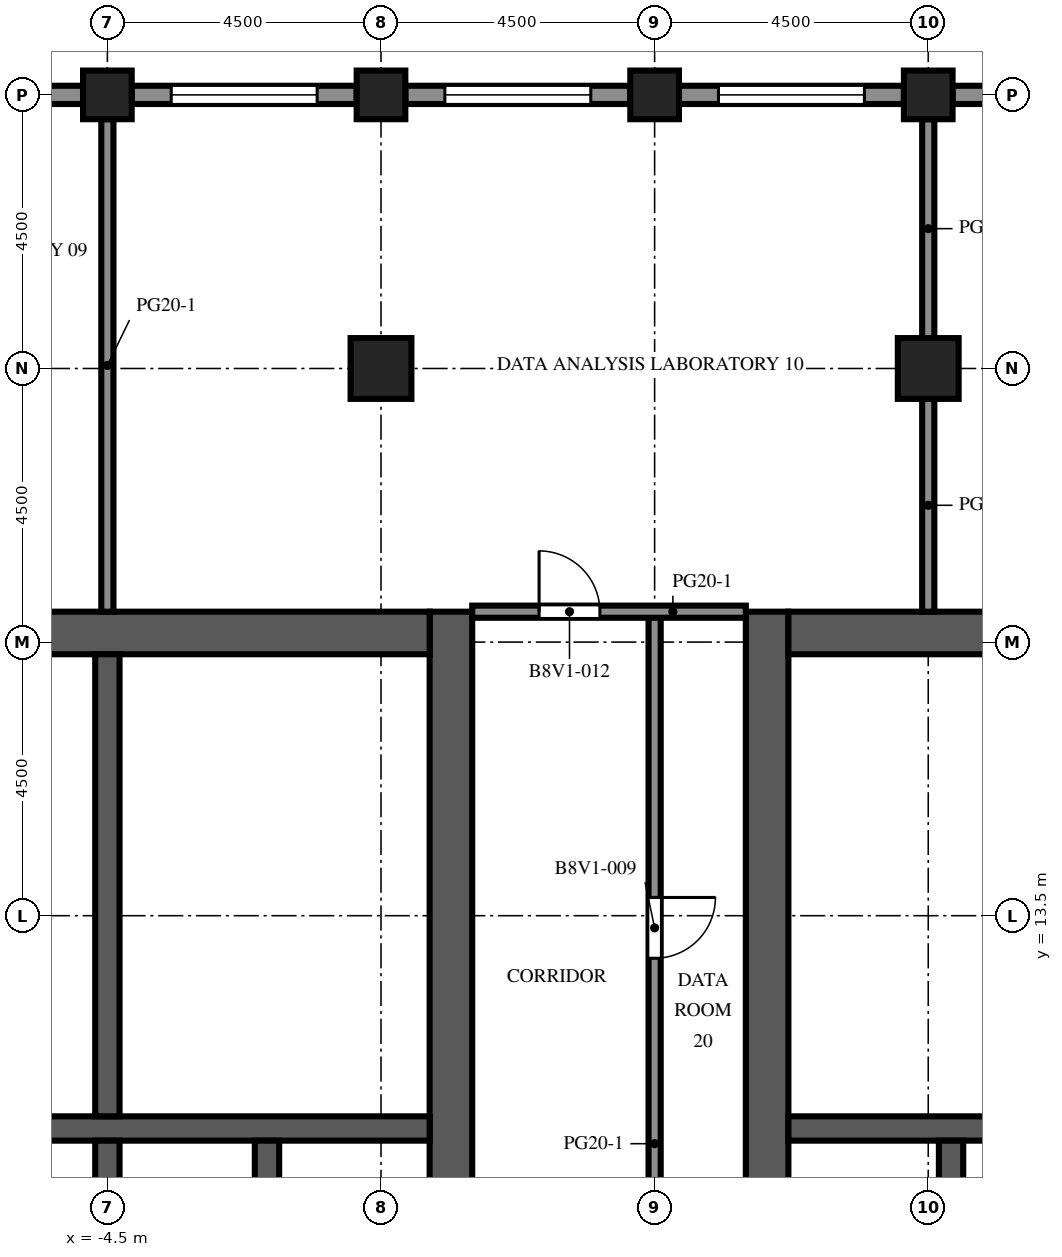
"""IFC4 building model, lengths in metres.
Left out: names, types, materials, properties, quantities, classifications, styles, units other than length and angle.
Written with IfcOpenShell. Run it as: python <this file> out.ifc"""

import sys

from ifc_helpers import new_model, si_unit, direction, frame, frame_2d, origin, origin_2d, place, context, subcontext, project, spatial, rectangle, extrude, element, fill, save


model = new_model("IFC4")
c1 = context("Model", 3, precision=1e-05, world=origin(), true_north=direction((0.0, 1.0)))
c2 = subcontext(c1, "Body", "Model", "MODEL_VIEW")
j1 = project(units=[si_unit("LENGTHUNIT", "METRE"), si_unit("PLANEANGLEUNIT", "RADIAN")], contexts=[c1])
p1 = place(None, origin())
s1 = spatial("IfcSite", under=j1, at=p1, CompositionType="ELEMENT")
p2 = place(p1, origin())
s2 = spatial("IfcBuilding", under=s1, at=p2, CompositionType="ELEMENT")
p3 = place(p2, frame((0.0, 0.0, 274.5)))
s3 = spatial("IfcBuildingStorey", under=s2, at=p3, CompositionType="ELEMENT", Elevation=274.5)
for number, where, z_axis, x_axis in (
    (1, (-4.5, 27.0, 0.0), (0.0, 0.0, 1.0), (1.0, 0.0, 0.0)),
    (2, (0.0, 27.0, 0.0), (0.0, 0.0, 1.0), (1.0, 0.0, 0.0)),
    (3, (4.5, 27.0, 0.0), (0.0, 0.0, 1.0), (1.0, 0.0, 0.0)),
    (4, (9.0, 27.0, 0.0), (0.0, 0.0, 1.0), (1.0, 0.0, 0.0)),
):
    element("IfcColumn", number, at=place(p3, frame(where, z_axis=z_axis, x_axis=x_axis)), inside=s3, PredefinedType="COLUMN", context=c2, shape_type="SweptSolid", body=[
        extrude(rectangle(XDim=0.8, YDim=0.8, at=origin_2d()), origin(), (0.0, 0.0, 1.0), 4.1),
    ])
for number, where, z_axis, x_axis in (
    (5, (0.0, 22.5, 0.0), (0.0, 0.0, 1.0), (1.0, 0.0, 0.0)),
    (6, (9.0, 22.5, 0.0), (0.0, 0.0, 1.0), (1.0, 0.0, 0.0)),
):
    element("IfcColumn", number, at=place(p3, frame(where, z_axis=z_axis, x_axis=x_axis)), inside=s3, PredefinedType="COLUMN", context=c2, shape_type="SweptSolid", body=[
        extrude(rectangle(XDim=1.0, YDim=1.0, at=origin_2d()), origin(), (0.0, 0.0, 1.0), 4.1),
    ])
p4 = place(p3, frame((1.15, -9.0, 0.0), z_axis=(0.0, 0.0, 1.0), x_axis=(0.0, 1.0, 0.0)))
e7 = element("IfcWall", 7, at=p4, inside=s3, PredefinedType="SHEAR", context=c2, shape_type="SweptSolid", body=[
    extrude(rectangle(XDim=27.5, YDim=0.7, at=frame_2d((13.75, 0.0))), origin(), (0.0, 0.0, 1.0), 4.1),
])
p5 = place(p4, frame((12.55, 0.0, 0.0)))
e8 = element("IfcOpeningElement", 8, at=p5, cuts=e7, PredefinedType="OPENING", context=c2, shape_type="SweptSolid", body=[
    extrude(rectangle(XDim=2.4, YDim=2.4, at=frame_2d((1.2, 1.2))), frame((0.0, 0.36, 0.0), z_axis=(0.0, -1.0, 0.0), x_axis=(1.0, 0.0, 0.0)), (0.0, 0.0, 1.0), 0.72),
])
p6 = place(p4, frame((3.9, 0.0, 0.0)))
e9 = element("IfcOpeningElement", 9, at=p6, cuts=e7, PredefinedType="OPENING", context=c2, shape_type="SweptSolid", body=[
    extrude(rectangle(XDim=1.2, YDim=2.1, at=frame_2d((0.6, 1.05))), frame((0.0, 0.36, 0.0), z_axis=(0.0, -1.0, 0.0), x_axis=(1.0, 0.0, 0.0)), (0.0, 0.0, 1.0), 0.72),
])
p7 = place(p4, frame((19.46, 0.0, 0.0)))
e10 = element("IfcOpeningElement", 10, at=p7, cuts=e7, PredefinedType="OPENING", context=c2, shape_type="SweptSolid", body=[
    extrude(rectangle(XDim=1.0, YDim=2.1, at=frame_2d((0.5, 1.05))), frame((0.0, 0.36, 0.0), z_axis=(0.0, -1.0, 0.0), x_axis=(1.0, 0.0, 0.0)), (0.0, 0.0, 1.0), 0.72),
])
p8 = place(p4, frame((21.17, 0.0, 0.0)))
e11 = element("IfcOpeningElement", 11, at=p8, cuts=e7, PredefinedType="OPENING", context=c2, shape_type="SweptSolid", body=[
    extrude(rectangle(XDim=1.0, YDim=2.1, at=frame_2d((0.5, 1.05))), frame((0.0, 0.36, 0.0), z_axis=(0.0, -1.0, 0.0), x_axis=(1.0, 0.0, 0.0)), (0.0, 0.0, 1.0), 0.72),
])
p9 = place(p4, frame((23.26, 0.0, 0.0)))
e12 = element("IfcOpeningElement", 12, at=p9, cuts=e7, PredefinedType="OPENING", context=c2, shape_type="SweptSolid", body=[
    extrude(rectangle(XDim=1.0, YDim=2.1, at=frame_2d((0.5, 1.05))), frame((0.0, 0.36, 0.0), z_axis=(0.0, -1.0, 0.0), x_axis=(1.0, 0.0, 0.0)), (0.0, 0.0, 1.0), 0.72),
])
p10 = place(p4, frame((25.35, 0.0, 0.0)))
e13 = element("IfcOpeningElement", 13, at=p10, cuts=e7, PredefinedType="OPENING", context=c2, shape_type="SweptSolid", body=[
    extrude(rectangle(XDim=1.0, YDim=2.1, at=frame_2d((0.5, 1.05))), frame((0.0, 0.36, 0.0), z_axis=(0.0, -1.0, 0.0), x_axis=(1.0, 0.0, 0.0)), (0.0, 0.0, 1.0), 0.72),
])
p11 = place(p3, frame((-9.8, 18.15, 0.0), z_axis=(0.0, 0.0, 1.0), x_axis=(1.0, 0.0, 0.0)))
e14 = element("IfcWall", 14, at=p11, inside=s3, PredefinedType="SHEAR", context=c2, shape_type="SweptSolid", body=[
    extrude(rectangle(XDim=10.6, YDim=0.7, at=frame_2d((5.3, 0.0))), origin(), (0.0, 0.0, 1.0), 4.1),
])
p12 = place(p3, frame((-9.8, 10.0, 0.0), z_axis=(0.0, 0.0, 1.0), x_axis=(1.0, 0.0, 0.0)))
e15 = element("IfcWall", 15, at=p12, inside=s3, PredefinedType="SHEAR", context=c2, shape_type="SweptSolid", body=[
    extrude(rectangle(XDim=10.6, YDim=0.4, at=frame_2d((5.3, 0.0))), origin(), (0.0, 0.0, 1.0), 4.1),
])
for number, where, z_axis, x_axis in (
    (16, (-4.5, 6.9, 0.0), (0.0, 0.0, 1.0), (0.0, 1.0, 0.0)),
    (17, (-1.875, 6.9, 0.0), (0.0, 0.0, 1.0), (0.0, 1.0, 0.0)),
):
    element("IfcWall", number, at=place(p3, frame(where, z_axis=z_axis, x_axis=x_axis)), inside=s3, PredefinedType="SHEAR", context=c2, shape_type="SweptSolid", body=[
        extrude(rectangle(XDim=2.9, YDim=0.4, at=frame_2d((1.45, 0.0))), origin(), (0.0, 0.0, 1.0), 4.1),
    ])
p13 = place(p3, frame((-4.5, 10.2, 0.0), z_axis=(0.0, 0.0, 1.0), x_axis=(0.0, 1.0, 0.0)))
e18 = element("IfcWall", 18, at=p13, inside=s3, PredefinedType="SHEAR", context=c2, shape_type="SweptSolid", body=[
    extrude(rectangle(XDim=7.6, YDim=0.4, at=frame_2d((3.8, 0.0))), origin(), (0.0, 0.0, 1.0), 4.1),
])
p14 = place(p3, frame((6.35, -9.0, 0.0), z_axis=(0.0, 0.0, 1.0), x_axis=(0.0, 1.0, 0.0)))
e19 = element("IfcWall", 19, at=p14, inside=s3, PredefinedType="SHEAR", context=c2, shape_type="SweptSolid", body=[
    extrude(rectangle(XDim=27.5, YDim=0.7, at=frame_2d((13.75, 0.0))), origin(), (0.0, 0.0, 1.0), 4.1),
])
p15 = place(p14, frame((12.55, 0.0, 0.0)))
e20 = element("IfcOpeningElement", 20, at=p15, cuts=e19, PredefinedType="OPENING", context=c2, shape_type="SweptSolid", body=[
    extrude(rectangle(XDim=2.4, YDim=2.4, at=frame_2d((1.2, 1.2))), frame((0.0, 0.36, 0.0), z_axis=(0.0, -1.0, 0.0), x_axis=(1.0, 0.0, 0.0)), (0.0, 0.0, 1.0), 0.72),
])
p16 = place(p14, frame((3.9, 0.0, 0.0)))
e21 = element("IfcOpeningElement", 21, at=p16, cuts=e19, PredefinedType="OPENING", context=c2, shape_type="SweptSolid", body=[
    extrude(rectangle(XDim=1.2, YDim=2.1, at=frame_2d((0.6, 1.05))), frame((0.0, 0.36, 0.0), z_axis=(0.0, -1.0, 0.0), x_axis=(1.0, 0.0, 0.0)), (0.0, 0.0, 1.0), 0.72),
])
p17 = place(p14, frame((19.46, 0.0, 0.0)))
e22 = element("IfcOpeningElement", 22, at=p17, cuts=e19, PredefinedType="OPENING", context=c2, shape_type="SweptSolid", body=[
    extrude(rectangle(XDim=1.0, YDim=2.1, at=frame_2d((0.5, 1.05))), frame((0.0, 0.36, 0.0), z_axis=(0.0, -1.0, 0.0), x_axis=(1.0, 0.0, 0.0)), (0.0, 0.0, 1.0), 0.72),
])
p18 = place(p14, frame((21.17, 0.0, 0.0)))
e23 = element("IfcOpeningElement", 23, at=p18, cuts=e19, PredefinedType="OPENING", context=c2, shape_type="SweptSolid", body=[
    extrude(rectangle(XDim=1.0, YDim=2.1, at=frame_2d((0.5, 1.05))), frame((0.0, 0.36, 0.0), z_axis=(0.0, -1.0, 0.0), x_axis=(1.0, 0.0, 0.0)), (0.0, 0.0, 1.0), 0.72),
])
p19 = place(p14, frame((23.26, 0.0, 0.0)))
e24 = element("IfcOpeningElement", 24, at=p19, cuts=e19, PredefinedType="OPENING", context=c2, shape_type="SweptSolid", body=[
    extrude(rectangle(XDim=1.0, YDim=2.1, at=frame_2d((0.5, 1.05))), frame((0.0, 0.36, 0.0), z_axis=(0.0, -1.0, 0.0), x_axis=(1.0, 0.0, 0.0)), (0.0, 0.0, 1.0), 0.72),
])
p20 = place(p14, frame((25.35, 0.0, 0.0)))
e25 = element("IfcOpeningElement", 25, at=p20, cuts=e19, PredefinedType="OPENING", context=c2, shape_type="SweptSolid", body=[
    extrude(rectangle(XDim=1.0, YDim=2.1, at=frame_2d((0.5, 1.05))), frame((0.0, 0.36, 0.0), z_axis=(0.0, -1.0, 0.0), x_axis=(1.0, 0.0, 0.0)), (0.0, 0.0, 1.0), 0.72),
])
p21 = place(p3, frame((6.7, 18.15, 0.0), z_axis=(0.0, 0.0, 1.0), x_axis=(1.0, 0.0, 0.0)))
e26 = element("IfcWall", 26, at=p21, inside=s3, PredefinedType="SHEAR", context=c2, shape_type="SweptSolid", body=[
    extrude(rectangle(XDim=10.6, YDim=0.7, at=frame_2d((5.3, 0.0))), origin(), (0.0, 0.0, 1.0), 4.1),
])
p22 = place(p3, frame((6.7, 10.0, 0.0), z_axis=(0.0, 0.0, 1.0), x_axis=(1.0, 0.0, 0.0)))
e27 = element("IfcWall", 27, at=p22, inside=s3, PredefinedType="SHEAR", context=c2, shape_type="SweptSolid", body=[
    extrude(rectangle(XDim=10.6, YDim=0.4, at=frame_2d((5.3, 0.0))), origin(), (0.0, 0.0, 1.0), 4.1),
])
p23 = place(p3, frame((9.375, 6.9, 0.0), z_axis=(0.0, 0.0, 1.0), x_axis=(0.0, 1.0, 0.0)))
e28 = element("IfcWall", 28, at=p23, inside=s3, PredefinedType="SHEAR", context=c2, shape_type="SweptSolid", body=[
    extrude(rectangle(XDim=2.9, YDim=0.4, at=frame_2d((1.45, 0.0))), origin(), (0.0, 0.0, 1.0), 4.1),
])
p24 = place(p3, frame((9.4, 27.0, 0.0), z_axis=(0.0, 0.0, 1.0), x_axis=(1.0, 0.0, 0.0)))
e29 = element("IfcWall", 29, at=p24, inside=s3, PredefinedType="SOLIDWALL", context=c2, shape_type="SweptSolid", body=[
    extrude(rectangle(XDim=3.7, YDim=0.3, at=frame_2d((1.85, 0.0))), origin(), (0.0, 0.0, 1.0), 2.85),
])
p25 = place(p24, frame((1.35, 0.0, 0.0)))
e30 = element("IfcOpeningElement", 30, at=p25, cuts=e29, PredefinedType="OPENING", context=c2, shape_type="SweptSolid", body=[
    extrude(rectangle(XDim=1.0, YDim=2.2, at=frame_2d((0.5, 1.1))), frame((0.0, 0.16, 0.0), z_axis=(0.0, -1.0, 0.0), x_axis=(1.0, 0.0, 0.0)), (0.0, 0.0, 1.0), 0.32),
])
p26 = place(p3, frame((4.9, 27.0, 0.0), z_axis=(0.0, 0.0, 1.0), x_axis=(1.0, 0.0, 0.0)))
e31 = element("IfcWall", 31, at=p26, inside=s3, PredefinedType="SOLIDWALL", context=c2, shape_type="SweptSolid", body=[
    extrude(rectangle(XDim=3.7, YDim=0.3, at=frame_2d((1.85, 0.0))), origin(), (0.0, 0.0, 1.0), 2.85),
])
p27 = place(p26, frame((0.65, 0.0, 0.8)))
e32 = element("IfcOpeningElement", 32, at=p27, cuts=e31, PredefinedType="OPENING", context=c2, shape_type="SweptSolid", body=[
    extrude(rectangle(XDim=2.4, YDim=1.7, at=frame_2d((1.2, 0.85))), frame((0.0, 0.16, 0.0), z_axis=(0.0, -1.0, 0.0), x_axis=(1.0, 0.0, 0.0)), (0.0, 0.0, 1.0), 0.32),
])
p28 = place(p3, frame((0.4, 27.0, 0.0), z_axis=(0.0, 0.0, 1.0), x_axis=(1.0, 0.0, 0.0)))
e33 = element("IfcWall", 33, at=p28, inside=s3, PredefinedType="SOLIDWALL", context=c2, shape_type="SweptSolid", body=[
    extrude(rectangle(XDim=3.7, YDim=0.3, at=frame_2d((1.85, 0.0))), origin(), (0.0, 0.0, 1.0), 2.85),
])
p29 = place(p28, frame((0.65, 0.0, 0.8)))
e34 = element("IfcOpeningElement", 34, at=p29, cuts=e33, PredefinedType="OPENING", context=c2, shape_type="SweptSolid", body=[
    extrude(rectangle(XDim=2.4, YDim=1.7, at=frame_2d((1.2, 0.85))), frame((0.0, 0.16, 0.0), z_axis=(0.0, -1.0, 0.0), x_axis=(1.0, 0.0, 0.0)), (0.0, 0.0, 1.0), 0.32),
])
p30 = place(p3, frame((-4.1, 27.0, 0.0), z_axis=(0.0, 0.0, 1.0), x_axis=(1.0, 0.0, 0.0)))
e35 = element("IfcWall", 35, at=p30, inside=s3, PredefinedType="SOLIDWALL", context=c2, shape_type="SweptSolid", body=[
    extrude(rectangle(XDim=3.7, YDim=0.3, at=frame_2d((1.85, 0.0))), origin(), (0.0, 0.0, 1.0), 2.85),
])
p31 = place(p30, frame((0.65, 0.0, 0.8)))
e36 = element("IfcOpeningElement", 36, at=p31, cuts=e35, PredefinedType="OPENING", context=c2, shape_type="SweptSolid", body=[
    extrude(rectangle(XDim=2.4, YDim=1.7, at=frame_2d((1.2, 0.85))), frame((0.0, 0.16, 0.0), z_axis=(0.0, -1.0, 0.0), x_axis=(1.0, 0.0, 0.0)), (0.0, 0.0, 1.0), 0.32),
])
p32 = place(p3, frame((-8.6, 27.0, 0.0), z_axis=(0.0, 0.0, 1.0), x_axis=(1.0, 0.0, 0.0)))
e37 = element("IfcWall", 37, at=p32, inside=s3, PredefinedType="SOLIDWALL", context=c2, shape_type="SweptSolid", body=[
    extrude(rectangle(XDim=3.7, YDim=0.3, at=frame_2d((1.85, 0.0))), origin(), (0.0, 0.0, 1.0), 2.85),
])
p33 = place(p32, frame((0.65, 0.0, 0.8)))
e38 = element("IfcOpeningElement", 38, at=p33, cuts=e37, PredefinedType="OPENING", context=c2, shape_type="SweptSolid", body=[
    extrude(rectangle(XDim=2.4, YDim=1.7, at=frame_2d((1.2, 0.85))), frame((0.0, 0.16, 0.0), z_axis=(0.0, -1.0, 0.0), x_axis=(1.0, 0.0, 0.0)), (0.0, 0.0, 1.0), 0.32),
])
for number, where, z_axis, x_axis in (
    (39, (-4.3, 11.72, 0.0), (0.0, 0.0, 1.0), (1.0, 0.0, 0.0)),
    (40, (-4.3, 13.62, 0.0), (0.0, 0.0, 1.0), (1.0, 0.0, 0.0)),
    (41, (-4.3, 15.9, 0.0), (0.0, 0.0, 1.0), (1.0, 0.0, 0.0)),
    (42, (6.7, 11.72, 0.0), (0.0, 0.0, 1.0), (1.0, 0.0, 0.0)),
    (43, (6.7, 13.62, 0.0), (0.0, 0.0, 1.0), (1.0, 0.0, 0.0)),
    (44, (6.7, 15.9, 0.0), (0.0, 0.0, 1.0), (1.0, 0.0, 0.0)),
):
    element("IfcWall", number, at=place(p3, frame(where, z_axis=z_axis, x_axis=x_axis)), inside=s3, PredefinedType="PARTITIONING", context=c2, shape_type="SweptSolid", body=[
        extrude(rectangle(XDim=5.1, YDim=0.1, at=frame_2d((2.55, 0.0))), origin(), (0.0, 0.0, 1.0), 3.65),
    ])
p34 = place(p3, frame((-4.5, 18.5, 0.0), z_axis=(0.0, 0.0, 1.0), x_axis=(0.0, 1.0, 0.0)))
e45 = element("IfcWall", 45, at=p34, inside=s3, PredefinedType="PARTITIONING", context=c2, shape_type="SweptSolid", body=[
    extrude(rectangle(XDim=8.1, YDim=0.2, at=frame_2d((4.05, 0.0))), origin(), (0.0, 0.0, 1.0), 3.65),
])
p35 = place(p3, frame((4.5, 18.5, 0.0), z_axis=(0.0, 0.0, 1.0), x_axis=(0.0, -1.0, 0.0)))
e46 = element("IfcWall", 46, at=p35, inside=s3, PredefinedType="PARTITIONING", context=c2, shape_type="SweptSolid", body=[
    extrude(rectangle(XDim=11.8, YDim=0.2, at=frame_2d((5.9, 0.0))), origin(), (0.0, 0.0, 1.0), 3.65),
])
p36 = place(p35, frame((4.7, 0.0, 0.0)))
e47 = element("IfcOpeningElement", 47, at=p36, cuts=e46, PredefinedType="OPENING", context=c2, shape_type="SweptSolid", body=[
    extrude(rectangle(XDim=1.0, YDim=2.1, at=frame_2d((0.5, 1.05))), frame((0.0, 0.11, 0.0), z_axis=(0.0, -1.0, 0.0), x_axis=(1.0, 0.0, 0.0)), (0.0, 0.0, 1.0), 0.22),
])
p37 = place(p3, frame((9.0, 18.5, 0.0), z_axis=(0.0, 0.0, 1.0), x_axis=(0.0, 1.0, 0.0)))
e48 = element("IfcWall", 48, at=p37, inside=s3, PredefinedType="PARTITIONING", context=c2, shape_type="SweptSolid", body=[
    extrude(rectangle(XDim=3.5, YDim=0.2, at=frame_2d((1.75, 0.0))), origin(), (0.0, 0.0, 1.0), 3.65),
])
p38 = place(p3, frame((9.0, 23.0, 0.0), z_axis=(0.0, 0.0, 1.0), x_axis=(0.0, 1.0, 0.0)))
e49 = element("IfcWall", 49, at=p38, inside=s3, PredefinedType="PARTITIONING", context=c2, shape_type="SweptSolid", body=[
    extrude(rectangle(XDim=3.6, YDim=0.2, at=frame_2d((1.8, 0.0))), origin(), (0.0, 0.0, 1.0), 3.65),
])
p39 = place(p3, frame((1.5, 18.5, 0.0), z_axis=(0.0, 0.0, 1.0), x_axis=(1.0, 0.0, 0.0)))
e50 = element("IfcWall", 50, at=p39, inside=s3, PredefinedType="PARTITIONING", context=c2, shape_type="SweptSolid", body=[
    extrude(rectangle(XDim=4.5, YDim=0.2, at=frame_2d((2.25, 0.0))), origin(), (0.0, 0.0, 1.0), 3.65),
])
p40 = place(p39, frame((1.1, 0.0, 0.0)))
e51 = element("IfcOpeningElement", 51, at=p40, cuts=e50, PredefinedType="OPENING", context=c2, shape_type="SweptSolid", body=[
    extrude(rectangle(XDim=1.0, YDim=2.1, at=frame_2d((0.5, 1.05))), frame((0.0, 0.11, 0.0), z_axis=(0.0, -1.0, 0.0), x_axis=(1.0, 0.0, 0.0)), (0.0, 0.0, 1.0), 0.22),
])
p41 = place(p27, origin())
e52 = element("IfcWindow", 52, at=p41, inside=s3, PartitioningType="SINGLE_PANEL", PredefinedType="WINDOW", context=c2, shape_type="SweptSolid", body=[
    extrude(rectangle(XDim=2.4, YDim=1.7, at=frame_2d((1.2, 0.85))), frame((0.0, 0.03, 0.0), z_axis=(0.0, -1.0, 0.0), x_axis=(1.0, 0.0, 0.0)), (0.0, 0.0, 1.0), 0.06),
])
fill(e32, e52)
p42 = place(p29, origin())
e53 = element("IfcWindow", 53, at=p42, inside=s3, PartitioningType="SINGLE_PANEL", PredefinedType="WINDOW", context=c2, shape_type="SweptSolid", body=[
    extrude(rectangle(XDim=2.4, YDim=1.7, at=frame_2d((1.2, 0.85))), frame((0.0, 0.03, 0.0), z_axis=(0.0, -1.0, 0.0), x_axis=(1.0, 0.0, 0.0)), (0.0, 0.0, 1.0), 0.06),
])
fill(e34, e53)
p43 = place(p31, origin())
e54 = element("IfcWindow", 54, at=p43, inside=s3, PartitioningType="SINGLE_PANEL", PredefinedType="WINDOW", context=c2, shape_type="SweptSolid", body=[
    extrude(rectangle(XDim=2.4, YDim=1.7, at=frame_2d((1.2, 0.85))), frame((0.0, 0.03, 0.0), z_axis=(0.0, -1.0, 0.0), x_axis=(1.0, 0.0, 0.0)), (0.0, 0.0, 1.0), 0.06),
])
fill(e36, e54)
p44 = place(p7, origin())
e55 = element("IfcDoor", 55, at=p44, inside=s3, OperationType="SINGLE_SWING_LEFT", PredefinedType="DOOR", context=c2, shape_type="SweptSolid", body=[
    extrude(rectangle(XDim=1.0, YDim=2.1, at=frame_2d((0.5, 1.05))), frame((0.0, 0.325, 0.0), z_axis=(0.0, -1.0, 0.0), x_axis=(1.0, 0.0, 0.0)), (0.0, 0.0, 1.0), 0.05),
])
fill(e10, e55)
p45 = place(p8, origin())
e56 = element("IfcDoor", 56, at=p45, inside=s3, OperationType="SINGLE_SWING_RIGHT", PredefinedType="DOOR", context=c2, shape_type="SweptSolid", body=[
    extrude(rectangle(XDim=1.0, YDim=2.1, at=frame_2d((0.5, 1.05))), frame((0.0, 0.325, 0.0), z_axis=(0.0, -1.0, 0.0), x_axis=(1.0, 0.0, 0.0)), (0.0, 0.0, 1.0), 0.05),
])
fill(e11, e56)
p46 = place(p9, origin())
e57 = element("IfcDoor", 57, at=p46, inside=s3, OperationType="SINGLE_SWING_LEFT", PredefinedType="DOOR", context=c2, shape_type="SweptSolid", body=[
    extrude(rectangle(XDim=1.0, YDim=2.1, at=frame_2d((0.5, 1.05))), frame((0.0, 0.325, 0.0), z_axis=(0.0, -1.0, 0.0), x_axis=(1.0, 0.0, 0.0)), (0.0, 0.0, 1.0), 0.05),
])
fill(e12, e57)
p47 = place(p10, origin())
e58 = element("IfcDoor", 58, at=p47, inside=s3, OperationType="SINGLE_SWING_RIGHT", PredefinedType="DOOR", context=c2, shape_type="SweptSolid", body=[
    extrude(rectangle(XDim=1.0, YDim=2.1, at=frame_2d((0.5, 1.05))), frame((0.0, 0.325, 0.0), z_axis=(0.0, -1.0, 0.0), x_axis=(1.0, 0.0, 0.0)), (0.0, 0.0, 1.0), 0.05),
])
fill(e13, e58)
p48 = place(p17, origin())
e59 = element("IfcDoor", 59, at=p48, inside=s3, OperationType="SINGLE_SWING_RIGHT", PredefinedType="DOOR", context=c2, shape_type="SweptSolid", body=[
    extrude(rectangle(XDim=1.0, YDim=2.1, at=frame_2d((0.5, 1.05))), frame((0.0, -0.275, 0.0), z_axis=(0.0, -1.0, 0.0), x_axis=(1.0, 0.0, 0.0)), (0.0, 0.0, 1.0), 0.05),
])
fill(e22, e59)
p49 = place(p18, origin())
e60 = element("IfcDoor", 60, at=p49, inside=s3, OperationType="SINGLE_SWING_LEFT", PredefinedType="DOOR", context=c2, shape_type="SweptSolid", body=[
    extrude(rectangle(XDim=1.0, YDim=2.1, at=frame_2d((0.5, 1.05))), frame((0.0, -0.275, 0.0), z_axis=(0.0, -1.0, 0.0), x_axis=(1.0, 0.0, 0.0)), (0.0, 0.0, 1.0), 0.05),
])
fill(e23, e60)
p50 = place(p19, origin())
e61 = element("IfcDoor", 61, at=p50, inside=s3, OperationType="SINGLE_SWING_RIGHT", PredefinedType="DOOR", context=c2, shape_type="SweptSolid", body=[
    extrude(rectangle(XDim=1.0, YDim=2.1, at=frame_2d((0.5, 1.05))), frame((0.0, -0.275, 0.0), z_axis=(0.0, -1.0, 0.0), x_axis=(1.0, 0.0, 0.0)), (0.0, 0.0, 1.0), 0.05),
])
fill(e24, e61)
p51 = place(p20, origin())
e62 = element("IfcDoor", 62, at=p51, inside=s3, OperationType="SINGLE_SWING_LEFT", PredefinedType="DOOR", context=c2, shape_type="SweptSolid", body=[
    extrude(rectangle(XDim=1.0, YDim=2.1, at=frame_2d((0.5, 1.05))), frame((0.0, -0.275, 0.0), z_axis=(0.0, -1.0, 0.0), x_axis=(1.0, 0.0, 0.0)), (0.0, 0.0, 1.0), 0.05),
])
fill(e25, e62)
p52 = place(p36, origin())
e63 = element("IfcDoor", 63, at=p52, inside=s3, OperationType="SINGLE_SWING_LEFT", PredefinedType="DOOR", context=c2, shape_type="SweptSolid", body=[
    extrude(rectangle(XDim=1.0, YDim=2.1, at=frame_2d((0.5, 1.05))), frame((0.0, 0.025, 0.0), z_axis=(0.0, -1.0, 0.0), x_axis=(1.0, 0.0, 0.0)), (0.0, 0.0, 1.0), 0.05),
])
fill(e47, e63)
p53 = place(p40, origin())
e64 = element("IfcDoor", 64, at=p53, inside=s3, OperationType="SINGLE_SWING_LEFT", PredefinedType="DOOR", context=c2, shape_type="SweptSolid", body=[
    extrude(rectangle(XDim=1.0, YDim=2.1, at=frame_2d((0.5, 1.05))), frame((0.0, 0.025, 0.0), z_axis=(0.0, -1.0, 0.0), x_axis=(1.0, 0.0, 0.0)), (0.0, 0.0, 1.0), 0.05),
])
fill(e51, e64)
save(model, sys.argv[1])
